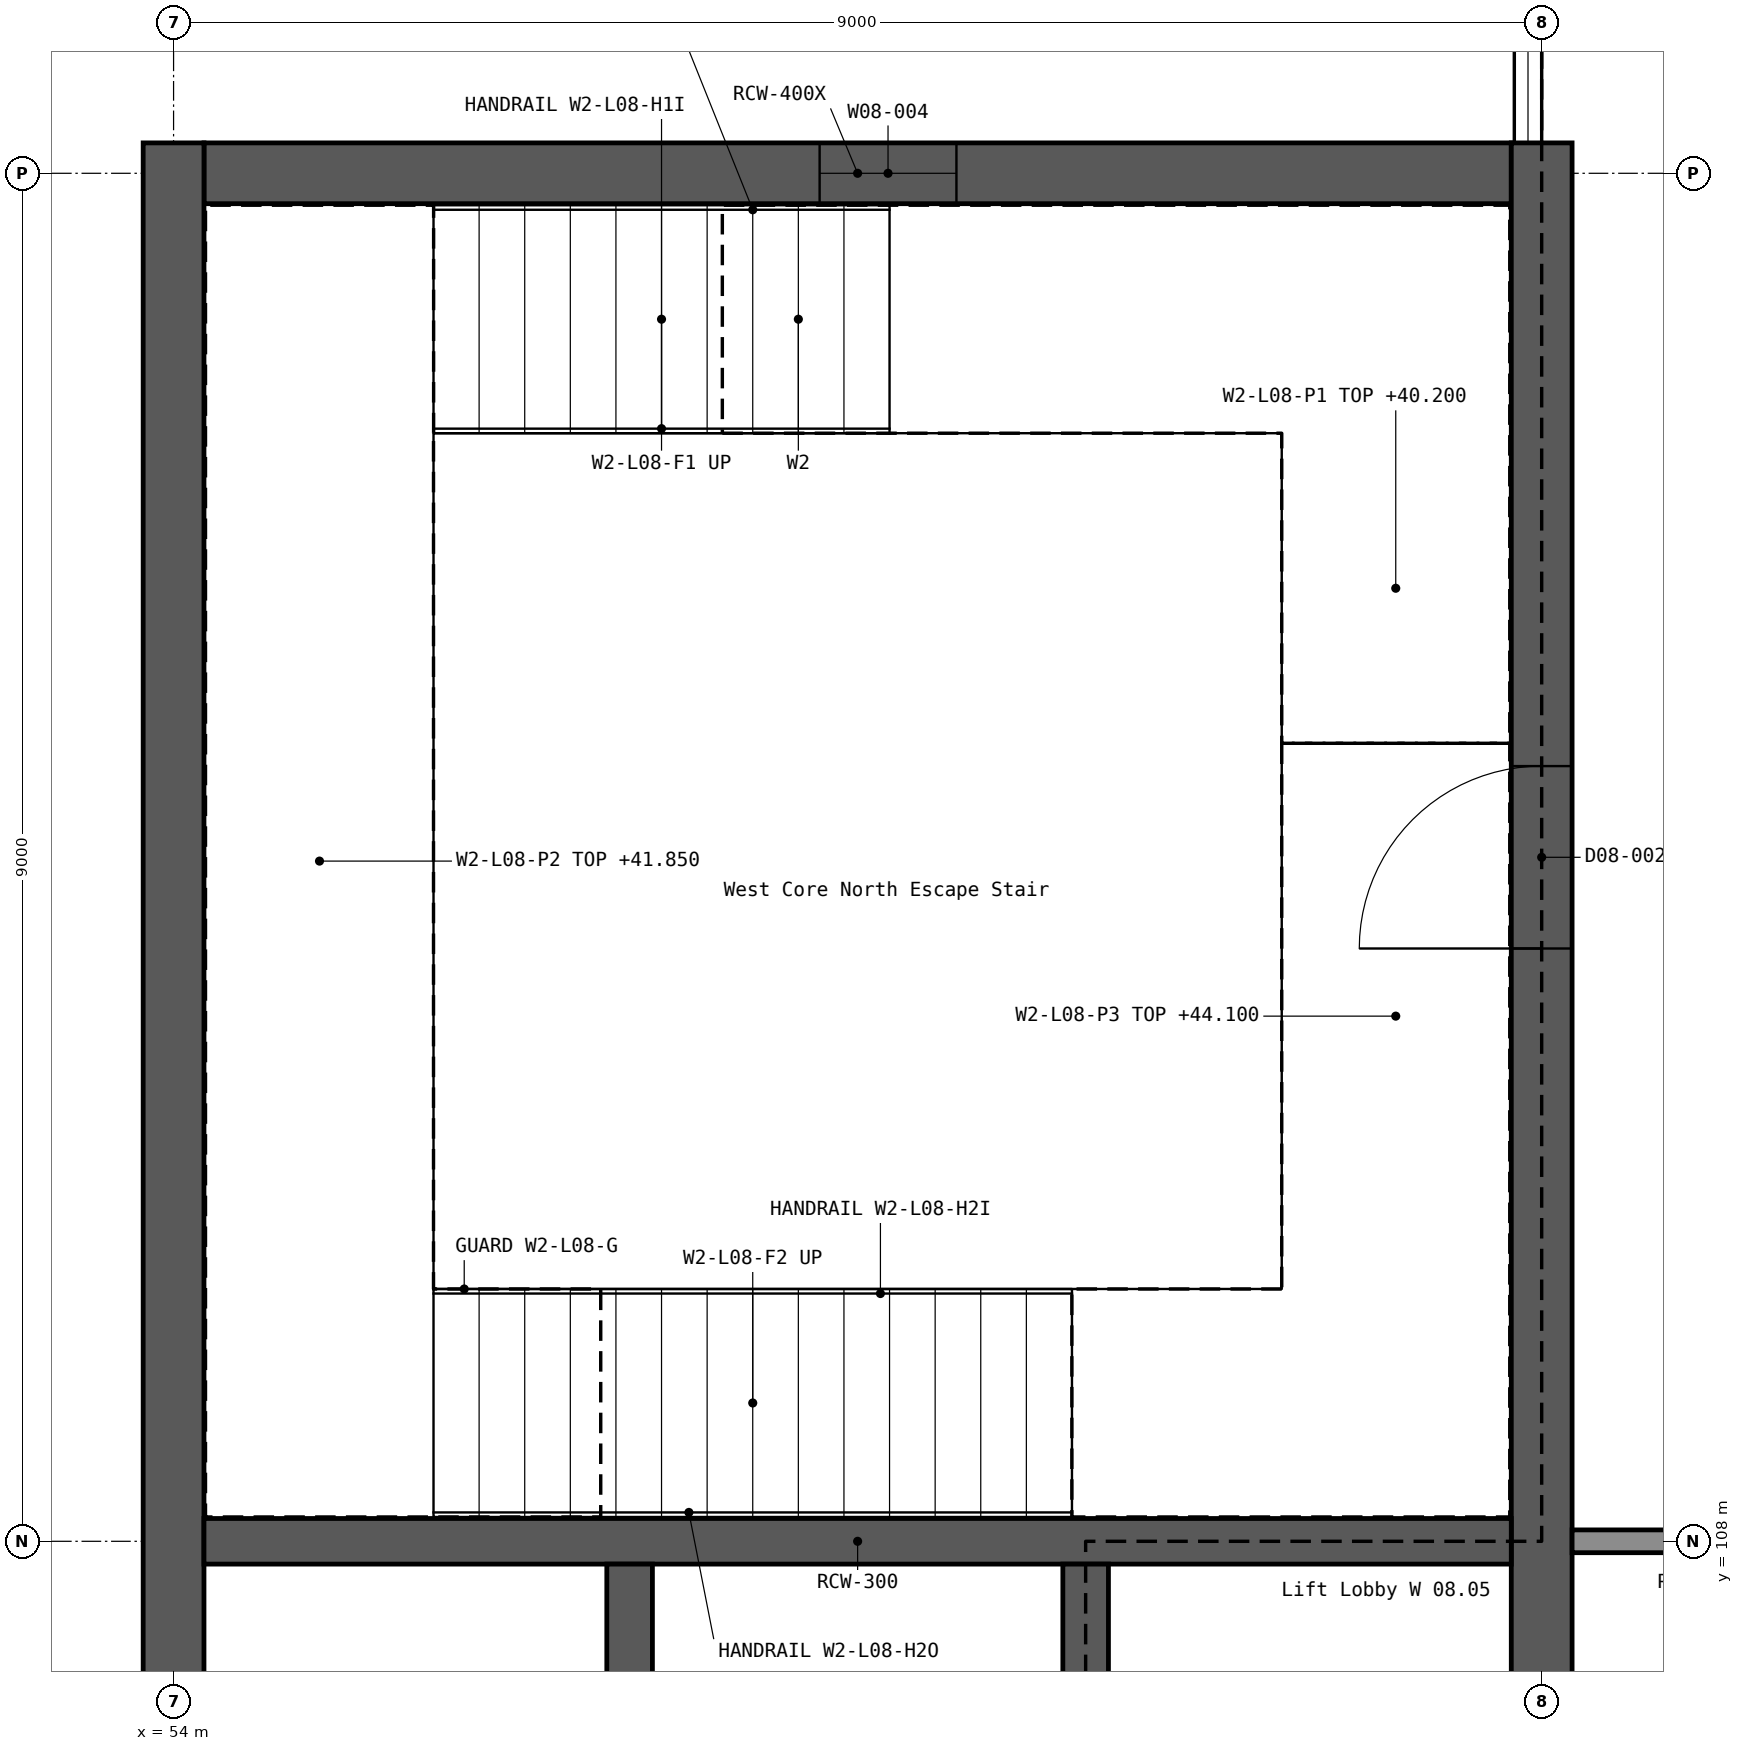
"""IFC4 building model, lengths in metres.
Left out: names, types, materials, properties, quantities, classifications, styles, units other than length and angle.
Written with IfcOpenShell. Run it as: python <this file> out.ifc"""

import sys

from ifc_helpers import new_model, si_unit, direction, frame, frame_2d, origin, place, context, subcontext, project, spatial, rectangle, extrude, element, fill, save


model = new_model("IFC4")
c1 = context("Model", 3, precision=1e-05, world=origin(), true_north=direction((0.0, 1.0)))
c2 = subcontext(c1, "Body", "Model", "MODEL_VIEW")
j1 = project(units=[si_unit("LENGTHUNIT", "METRE"), si_unit("PLANEANGLEUNIT", "RADIAN")], contexts=[c1])
p1 = place(None, origin())
s1 = spatial("IfcSite", under=j1, at=p1, CompositionType="ELEMENT")
p2 = place(p1, origin())
s2 = spatial("IfcBuilding", under=s1, at=p2, CompositionType="ELEMENT")
p3 = place(p2, frame((0.0, 0.0, 40.2)))
s3 = spatial("IfcBuildingStorey", under=s2, at=p3, CompositionType="ELEMENT", Elevation=40.2)
p4 = place(p3, frame((54.2, 117.0, 0.0), z_axis=(0.0, 0.0, 1.0), x_axis=(1.0, 0.0, 0.0)))
e1 = element("IfcWall", 1, at=p4, inside=s3, PredefinedType="SHEAR", context=c2, shape_type="SweptSolid", body=[
    extrude(rectangle(XDim=8.6, YDim=0.4, at=frame_2d((4.3, 0.0))), origin(), (0.0, 0.0, 1.0), 3.9),
])
p5 = place(p4, frame((4.05, 0.0, 1.2)))
e2 = element("IfcOpeningElement", 2, at=p5, cuts=e1, PredefinedType="OPENING", context=c2, shape_type="SweptSolid", body=[
    extrude(rectangle(XDim=0.9, YDim=1.5, at=frame_2d((0.45, 0.75))), frame((0.0, 0.211, 0.0), z_axis=(0.0, -1.0, 0.0), x_axis=(1.0, 0.0, 0.0)), (0.0, 0.0, 1.0), 0.422),
])
p6 = place(p3, frame((54.0, 89.8, 0.0), z_axis=(0.0, 0.0, 1.0), x_axis=(0.0, 1.0, 0.0)))
e3 = element("IfcWall", 3, at=p6, inside=s3, PredefinedType="SHEAR", context=c2, shape_type="SweptSolid", body=[
    extrude(rectangle(XDim=27.4, YDim=0.4, at=frame_2d((13.7, 0.0))), origin(), (0.0, 0.0, 1.0), 3.9),
])
p7 = place(p3, frame((63.0, 89.8, 0.0), z_axis=(0.0, 0.0, 1.0), x_axis=(0.0, 1.0, 0.0)))
e4 = element("IfcWall", 4, at=p7, inside=s3, PredefinedType="SHEAR", context=c2, shape_type="SweptSolid", body=[
    extrude(rectangle(XDim=27.4, YDim=0.4, at=frame_2d((13.7, 0.0))), origin(), (0.0, 0.0, 1.0), 3.9),
])
p8 = place(p7, frame((4.1, 0.0, 0.0)))
e5 = element("IfcOpeningElement", 5, at=p8, cuts=e4, PredefinedType="OPENING", context=c2, shape_type="SweptSolid", body=[
    extrude(rectangle(XDim=1.2, YDim=2.1, at=frame_2d((0.6, 1.05))), frame((0.0, 0.211, 0.0), z_axis=(0.0, -1.0, 0.0), x_axis=(1.0, 0.0, 0.0)), (0.0, 0.0, 1.0), 0.422),
])
p9 = place(p7, frame((22.1, 0.0, 0.0)))
e6 = element("IfcOpeningElement", 6, at=p9, cuts=e4, PredefinedType="OPENING", context=c2, shape_type="SweptSolid", body=[
    extrude(rectangle(XDim=1.2, YDim=2.1, at=frame_2d((0.6, 1.05))), frame((0.0, 0.211, 0.0), z_axis=(0.0, -1.0, 0.0), x_axis=(1.0, 0.0, 0.0)), (0.0, 0.0, 1.0), 0.422),
])
p10 = place(p7, frame((12.5, 0.0, 0.0)))
e7 = element("IfcOpeningElement", 7, at=p10, cuts=e4, PredefinedType="OPENING", context=c2, shape_type="SweptSolid", body=[
    extrude(rectangle(XDim=2.0, YDim=2.1, at=frame_2d((1.0, 1.05))), frame((0.0, 0.211, 0.0), z_axis=(0.0, -1.0, 0.0), x_axis=(1.0, 0.0, 0.0)), (0.0, 0.0, 1.0), 0.422),
])
p11 = place(p3, frame((54.2, 108.0, 0.0), z_axis=(0.0, 0.0, 1.0), x_axis=(1.0, 0.0, 0.0)))
e8 = element("IfcWall", 8, at=p11, inside=s3, PredefinedType="SHEAR", context=c2, shape_type="SweptSolid", body=[
    extrude(rectangle(XDim=8.6, YDim=0.3, at=frame_2d((4.3, 0.0))), origin(), (0.0, 0.0, 1.0), 3.9),
])
p12 = place(p3, frame((57.0, 99.15, 0.0), z_axis=(0.0, 0.0, 1.0), x_axis=(0.0, 1.0, 0.0)))
e9 = element("IfcWall", 9, at=p12, inside=s3, PredefinedType="SHEAR", context=c2, shape_type="SweptSolid", body=[
    extrude(rectangle(XDim=8.7, YDim=0.3, at=frame_2d((4.35, 0.0))), origin(), (0.0, 0.0, 1.0), 3.9),
])
p13 = place(p3, frame((60.0, 99.15, 0.0), z_axis=(0.0, 0.0, 1.0), x_axis=(0.0, 1.0, 0.0)))
e10 = element("IfcWall", 10, at=p13, inside=s3, PredefinedType="SHEAR", context=c2, shape_type="SweptSolid", body=[
    extrude(rectangle(XDim=8.7, YDim=0.3, at=frame_2d((4.35, 0.0))), origin(), (0.0, 0.0, 1.0), 3.9),
])
p14 = place(p13, frame((0.8, 0.0, 0.0)))
e11 = element("IfcOpeningElement", 11, at=p14, cuts=e10, PredefinedType="OPENING", context=c2, shape_type="SweptSolid", body=[
    extrude(rectangle(XDim=1.1, YDim=2.1, at=frame_2d((0.55, 1.05))), frame((0.0, 0.161, 0.0), z_axis=(0.0, -1.0, 0.0), x_axis=(1.0, 0.0, 0.0)), (0.0, 0.0, 1.0), 0.322),
])
p15 = place(p13, frame((3.8, 0.0, 0.0)))
e12 = element("IfcOpeningElement", 12, at=p15, cuts=e10, PredefinedType="OPENING", context=c2, shape_type="SweptSolid", body=[
    extrude(rectangle(XDim=1.1, YDim=2.1, at=frame_2d((0.55, 1.05))), frame((0.0, 0.161, 0.0), z_axis=(0.0, -1.0, 0.0), x_axis=(1.0, 0.0, 0.0)), (0.0, 0.0, 1.0), 0.322),
])
p16 = place(p13, frame((6.8, 0.0, 0.0)))
e13 = element("IfcOpeningElement", 13, at=p16, cuts=e10, PredefinedType="OPENING", context=c2, shape_type="SweptSolid", body=[
    extrude(rectangle(XDim=1.1, YDim=2.1, at=frame_2d((0.55, 1.05))), frame((0.0, 0.161, 0.0), z_axis=(0.0, -1.0, 0.0), x_axis=(1.0, 0.0, 0.0)), (0.0, 0.0, 1.0), 0.322),
])
p17 = place(p3, frame((63.2, 108.0, 0.0), z_axis=(0.0, 0.0, 1.0), x_axis=(1.0, 0.0, 0.0)))
e14 = element("IfcWall", 14, at=p17, inside=s3, PredefinedType="PARTITIONING", context=c2, shape_type="SweptSolid", body=[
    extrude(rectangle(XDim=2.8, YDim=0.15, at=frame_2d((1.4, 0.0))), origin(), (0.0, 0.0, 1.0), 3.22),
])
p18 = place(p17, frame((0.7, 0.0, 0.0)))
e15 = element("IfcOpeningElement", 15, at=p18, cuts=e14, PredefinedType="OPENING", context=c2, shape_type="SweptSolid", body=[
    extrude(rectangle(XDim=1.2, YDim=2.1, at=frame_2d((0.6, 1.05))), frame((0.0, 0.086, 0.0), z_axis=(0.0, -1.0, 0.0), x_axis=(1.0, 0.0, 0.0)), (0.0, 0.0, 1.0), 0.172),
])
p19 = place(p5, origin())
e16 = element("IfcWindow", 16, at=p19, inside=s3, PartitioningType="SINGLE_PANEL", PredefinedType="WINDOW", context=c2, shape_type="SweptSolid", body=[
    extrude(rectangle(XDim=0.9, YDim=1.5, at=frame_2d((0.45, 0.75))), frame((0.0, 0.03, 0.0), z_axis=(0.0, -1.0, 0.0), x_axis=(1.0, 0.0, 0.0)), (0.0, 0.0, 1.0), 0.06),
])
fill(e2, e16)
p20 = place(p9, origin())
e17 = element("IfcDoor", 17, at=p20, inside=s3, OperationType="SINGLE_SWING_LEFT", PredefinedType="DOOR", context=c2, shape_type="SweptSolid", body=[
    extrude(rectangle(XDim=1.2, YDim=2.1, at=frame_2d((0.6, 1.05))), frame((0.0, 0.025, 0.0), z_axis=(0.0, -1.0, 0.0), x_axis=(1.0, 0.0, 0.0)), (0.0, 0.0, 1.0), 0.05),
])
fill(e6, e17)
save(model, sys.argv[1])
